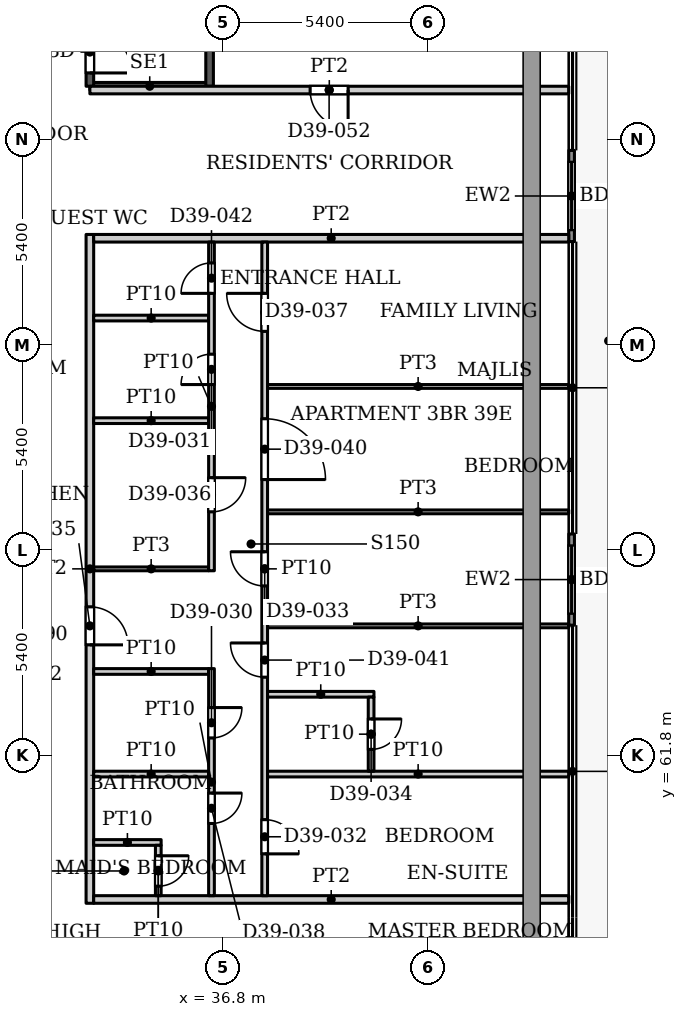
"""IFC4 building model, lengths in metres.
Left out: names, types, materials, properties, quantities, classifications, styles, units other than length and angle.
Written with IfcOpenShell. Run it as: python <this file> out.ifc"""

import sys

from ifc_helpers import new_model, si_unit, direction, frame, frame_2d, origin, place, context, subcontext, project, spatial, rectangle, extrude, source, transform, mapped, element, fill, save


model = new_model("IFC4")
c1 = context("Model", 3, precision=1e-05, world=origin(), true_north=direction((0.0, 1.0)))
c2 = subcontext(c1, "Body", "Model", "MODEL_VIEW")
j1 = project(units=[si_unit("LENGTHUNIT", "METRE"), si_unit("PLANEANGLEUNIT", "RADIAN")], contexts=[c1])
p1 = place(None, origin())
s1 = spatial("IfcSite", under=j1, at=p1, CompositionType="ELEMENT")
p2 = place(p1, origin())
s2 = spatial("IfcBuilding", under=s1, at=p2, CompositionType="ELEMENT")
p3 = place(p2, frame((0.0, 0.0, 168.2)))
s3 = spatial("IfcBuildingStorey", under=s2, at=p3, CompositionType="ELEMENT", Elevation=168.2)
p4 = place(p3, frame((45.975, 77.712, 0.0), z_axis=(0.0, 0.0, 1.0), x_axis=(0.0, -1.0, 0.0)))
e1 = element("IfcWall", 1, at=p4, inside=s3, PredefinedType="SOLIDWALL", context=c2, shape_type="SweptSolid", body=[
    extrude(rectangle(XDim=2.4, YDim=0.15, at=frame_2d((1.2, 0.0))), origin(), (0.0, 0.0, 1.0), 3.75),
])
p5 = place(p4, frame((0.3, 0.0, 0.0)))
e2 = element("IfcOpeningElement", 2, at=p5, cuts=e1, PredefinedType="OPENING", context=c2, shape_type="SweptSolid", body=[
    extrude(rectangle(XDim=1.8, YDim=2.4, at=frame_2d((0.9, 1.2))), frame((0.0, 0.085, 0.0), z_axis=(0.0, -1.0, 0.0), x_axis=(1.0, 0.0, 0.0)), (0.0, 0.0, 1.0), 0.17),
])
p6 = place(p3, frame((45.975, 67.618, 0.0), z_axis=(0.0, 0.0, 1.0), x_axis=(0.0, -1.0, 0.0)))
e3 = element("IfcWall", 3, at=p6, inside=s3, PredefinedType="SOLIDWALL", context=c2, shape_type="SweptSolid", body=[
    extrude(rectangle(XDim=2.4, YDim=0.15, at=frame_2d((1.2, 0.0))), origin(), (0.0, 0.0, 1.0), 3.75),
])
p7 = place(p6, frame((0.3, 0.0, 0.0)))
e4 = element("IfcOpeningElement", 4, at=p7, cuts=e3, PredefinedType="OPENING", context=c2, shape_type="SweptSolid", body=[
    extrude(rectangle(XDim=1.8, YDim=2.4, at=frame_2d((0.9, 1.2))), frame((0.0, 0.085, 0.0), z_axis=(0.0, -1.0, 0.0), x_axis=(1.0, 0.0, 0.0)), (0.0, 0.0, 1.0), 0.17),
])
p8 = place(p3, frame((33.3, 79.4, 0.0), z_axis=(0.0, 0.0, 1.0), x_axis=(1.0, 0.0, 0.0)))
e5 = element("IfcWall", 5, at=p8, inside=s3, PredefinedType="SHEAR", context=c2, shape_type="SweptSolid", body=[
    extrude(rectangle(XDim=3.15, YDim=0.2, at=frame_2d((1.575, 0.0))), origin(), (0.0, 0.0, 1.0), 3.9),
])
p9 = place(p3, frame((33.3, 79.4, 0.0), z_axis=(0.0, 0.0, 1.0), x_axis=(0.0, 1.0, 0.0)))
e6 = element("IfcWall", 6, at=p9, inside=s3, PredefinedType="SHEAR", context=c2, shape_type="SweptSolid", body=[
    extrude(rectangle(XDim=9.16, YDim=0.2, at=frame_2d((4.58, 0.0))), origin(), (0.0, 0.0, 1.0), 3.9),
])
p10 = place(p9, frame((0.35, 0.0, 0.0)))
e7 = element("IfcOpeningElement", 7, at=p10, cuts=e6, PredefinedType="OPENING", context=c2, shape_type="SweptSolid", body=[
    extrude(rectangle(XDim=1.1, YDim=2.2, at=frame_2d((0.55, 1.1))), frame((0.0, 0.11, 0.0), z_axis=(0.0, -1.0, 0.0), x_axis=(1.0, 0.0, 0.0)), (0.0, 0.0, 1.0), 0.22),
])
p11 = place(p3, frame((36.45, 79.4, 0.0), z_axis=(0.0, 0.0, 1.0), x_axis=(0.0, 1.0, 0.0)))
e8 = element("IfcWall", 8, at=p11, inside=s3, PredefinedType="SHEAR", context=c2, shape_type="SweptSolid", body=[
    extrude(rectangle(XDim=9.16, YDim=0.2, at=frame_2d((4.58, 0.0))), origin(), (0.0, 0.0, 1.0), 3.9),
])
p12 = place(p3, frame((33.3, 57.9, 0.0), z_axis=(0.0, 0.0, 1.0), x_axis=(0.0, 1.0, 0.0)))
e9 = element("IfcWall", 9, at=p12, inside=s3, PredefinedType="PARTITIONING", context=c2, shape_type="SweptSolid", body=[
    extrude(rectangle(XDim=17.6, YDim=0.2, at=frame_2d((8.8, 0.0))), origin(), (0.0, 0.0, 1.0), 3.6),
])
p13 = place(p12, frame((6.8, 0.0, 0.0)))
e10 = element("IfcOpeningElement", 10, at=p13, cuts=e9, PredefinedType="OPENING", context=c2, shape_type="SweptSolid", body=[
    extrude(rectangle(XDim=1.0, YDim=2.1, at=frame_2d((0.5, 1.05))), frame((0.0, 0.11, 0.0), z_axis=(0.0, -1.0, 0.0), x_axis=(1.0, 0.0, 0.0)), (0.0, 0.0, 1.0), 0.22),
])
p14 = place(p3, frame((33.3, 79.3, 0.0), z_axis=(0.0, 0.0, 1.0), x_axis=(1.0, 0.0, 0.0)))
e11 = element("IfcWall", 11, at=p14, inside=s3, PredefinedType="PARTITIONING", context=c2, shape_type="SweptSolid", body=[
    extrude(rectangle(XDim=12.6, YDim=0.2, at=frame_2d((6.3, 0.0))), origin(), (0.0, 0.0, 1.0), 3.6),
])
p15 = place(p14, frame((5.795, 0.0, 0.0)))
e12 = element("IfcOpeningElement", 12, at=p15, cuts=e11, PredefinedType="OPENING", context=c2, shape_type="SweptSolid", body=[
    extrude(rectangle(XDim=1.0, YDim=2.1, at=frame_2d((0.5, 1.05))), frame((0.0, 0.11, 0.0), z_axis=(0.0, -1.0, 0.0), x_axis=(1.0, 0.0, 0.0)), (0.0, 0.0, 1.0), 0.22),
])
p16 = place(p3, frame((33.4, 58.0, 0.0), z_axis=(0.0, 0.0, 1.0), x_axis=(1.0, 0.0, 0.0)))
e13 = element("IfcWall", 13, at=p16, inside=s3, PredefinedType="PARTITIONING", context=c2, shape_type="SweptSolid", body=[
    extrude(rectangle(XDim=12.5, YDim=0.2, at=frame_2d((6.25, 0.0))), origin(), (0.0, 0.0, 1.0), 3.6),
])
p17 = place(p3, frame((33.4, 59.5, 0.0), z_axis=(0.0, 0.0, 1.0), x_axis=(1.0, 0.0, 0.0)))
e14 = element("IfcWall", 14, at=p17, inside=s3, PredefinedType="PARTITIONING", context=c2, shape_type="SweptSolid", body=[
    extrude(rectangle(XDim=1.775, YDim=0.15, at=frame_2d((0.888, 0.0))), origin(), (0.0, 0.0, 1.0), 3.6),
])
for number, where, z_axis, x_axis in (
    (15, (33.4, 61.3, 0.0), (0.0, 0.0, 1.0), (1.0, 0.0, 0.0)),
    (16, (33.4, 64.0, 0.0), (0.0, 0.0, 1.0), (1.0, 0.0, 0.0)),
):
    element("IfcWall", number, at=place(p3, frame(where, z_axis=z_axis, x_axis=x_axis)), inside=s3, PredefinedType="PARTITIONING", context=c2, shape_type="SweptSolid", body=[
        extrude(rectangle(XDim=3.025, YDim=0.15, at=frame_2d((1.513, 0.0))), origin(), (0.0, 0.0, 1.0), 3.6),
    ])
p18 = place(p3, frame((33.4, 66.7, 0.0), z_axis=(0.0, 0.0, 1.0), x_axis=(1.0, 0.0, 0.0)))
e17 = element("IfcWall", 17, at=p18, inside=s3, PredefinedType="PARTITIONING", context=c2, shape_type="SweptSolid", body=[
    extrude(rectangle(XDim=3.025, YDim=0.1, at=frame_2d((1.513, 0.0))), origin(), (0.0, 0.0, 1.0), 3.6),
])
for number, where, z_axis, x_axis in (
    (18, (33.4, 70.6, 0.0), (0.0, 0.0, 1.0), (1.0, 0.0, 0.0)),
    (19, (33.4, 73.3, 0.0), (0.0, 0.0, 1.0), (1.0, 0.0, 0.0)),
):
    element("IfcWall", number, at=place(p3, frame(where, z_axis=z_axis, x_axis=x_axis)), inside=s3, PredefinedType="PARTITIONING", context=c2, shape_type="SweptSolid", body=[
        extrude(rectangle(XDim=3.025, YDim=0.15, at=frame_2d((1.513, 0.0))), origin(), (0.0, 0.0, 1.0), 3.6),
    ])
p19 = place(p3, frame((33.4, 75.4, 0.0), z_axis=(0.0, 0.0, 1.0), x_axis=(1.0, 0.0, 0.0)))
e20 = element("IfcWall", 20, at=p19, inside=s3, PredefinedType="PARTITIONING", context=c2, shape_type="SweptSolid", body=[
    extrude(rectangle(XDim=12.5, YDim=0.2, at=frame_2d((6.25, 0.0))), origin(), (0.0, 0.0, 1.0), 3.6),
])
p20 = place(p3, frame((35.1, 58.1, 0.0), z_axis=(0.0, 0.0, 1.0), x_axis=(0.0, 1.0, 0.0)))
e21 = element("IfcWall", 21, at=p20, inside=s3, PredefinedType="PARTITIONING", context=c2, shape_type="SweptSolid", body=[
    extrude(rectangle(XDim=1.325, YDim=0.15, at=frame_2d((0.663, 0.0))), origin(), (0.0, 0.0, 1.0), 3.6),
])
p21 = place(p20, frame((0.25, 0.0, 0.0)))
e22 = element("IfcOpeningElement", 22, at=p21, cuts=e21, PredefinedType="OPENING", context=c2, shape_type="SweptSolid", body=[
    extrude(rectangle(XDim=0.8, YDim=2.1, at=frame_2d((0.4, 1.05))), frame((0.0, 0.085, 0.0), z_axis=(0.0, -1.0, 0.0), x_axis=(1.0, 0.0, 0.0)), (0.0, 0.0, 1.0), 0.17),
])
p22 = place(p3, frame((36.5, 58.1, 0.0), z_axis=(0.0, 0.0, 1.0), x_axis=(0.0, 1.0, 0.0)))
e23 = element("IfcWall", 23, at=p22, inside=s3, PredefinedType="PARTITIONING", context=c2, shape_type="SweptSolid", body=[
    extrude(rectangle(XDim=5.975, YDim=0.15, at=frame_2d((2.987, 0.0))), origin(), (0.0, 0.0, 1.0), 3.6),
])
p23 = place(p22, frame((4.15, 0.0, 0.0)))
e24 = element("IfcOpeningElement", 24, at=p23, cuts=e23, PredefinedType="OPENING", context=c2, shape_type="SweptSolid", body=[
    extrude(rectangle(XDim=0.8, YDim=2.1, at=frame_2d((0.4, 1.05))), frame((0.0, 0.085, 0.0), z_axis=(0.0, -1.0, 0.0), x_axis=(1.0, 0.0, 0.0)), (0.0, 0.0, 1.0), 0.17),
])
p24 = place(p22, frame((1.9, 0.0, 0.0)))
e25 = element("IfcOpeningElement", 25, at=p24, cuts=e23, PredefinedType="OPENING", context=c2, shape_type="SweptSolid", body=[
    extrude(rectangle(XDim=0.8, YDim=2.1, at=frame_2d((0.4, 1.05))), frame((0.0, 0.085, 0.0), z_axis=(0.0, -1.0, 0.0), x_axis=(1.0, 0.0, 0.0)), (0.0, 0.0, 1.0), 0.17),
])
p25 = place(p3, frame((36.5, 66.65, 0.0), z_axis=(0.0, 0.0, 1.0), x_axis=(0.0, 1.0, 0.0)))
e26 = element("IfcWall", 26, at=p25, inside=s3, PredefinedType="PARTITIONING", context=c2, shape_type="SweptSolid", body=[
    extrude(rectangle(XDim=8.65, YDim=0.15, at=frame_2d((4.325, 0.0))), origin(), (0.0, 0.0, 1.0), 3.6),
])
p26 = place(p25, frame((4.9, 0.0, 0.0)))
e27 = element("IfcOpeningElement", 27, at=p26, cuts=e26, PredefinedType="OPENING", context=c2, shape_type="SweptSolid", body=[
    extrude(rectangle(XDim=0.8, YDim=2.1, at=frame_2d((0.4, 1.05))), frame((0.0, 0.085, 0.0), z_axis=(0.0, -1.0, 0.0), x_axis=(1.0, 0.0, 0.0)), (0.0, 0.0, 1.0), 0.17),
])
p27 = place(p25, frame((1.55, 0.0, 0.0)))
e28 = element("IfcOpeningElement", 28, at=p27, cuts=e26, PredefinedType="OPENING", context=c2, shape_type="SweptSolid", body=[
    extrude(rectangle(XDim=0.9, YDim=2.1, at=frame_2d((0.45, 1.05))), frame((0.0, 0.085, 0.0), z_axis=(0.0, -1.0, 0.0), x_axis=(1.0, 0.0, 0.0)), (0.0, 0.0, 1.0), 0.17),
])
p28 = place(p25, frame((7.3, 0.0, 0.0)))
e29 = element("IfcOpeningElement", 29, at=p28, cuts=e26, PredefinedType="OPENING", context=c2, shape_type="SweptSolid", body=[
    extrude(rectangle(XDim=0.8, YDim=2.1, at=frame_2d((0.4, 1.05))), frame((0.0, 0.085, 0.0), z_axis=(0.0, -1.0, 0.0), x_axis=(1.0, 0.0, 0.0)), (0.0, 0.0, 1.0), 0.17),
])
p29 = place(p3, frame((37.9, 58.1, 0.0), z_axis=(0.0, 0.0, 1.0), x_axis=(0.0, 1.0, 0.0)))
e30 = element("IfcWall", 30, at=p29, inside=s3, PredefinedType="PARTITIONING", context=c2, shape_type="SweptSolid", body=[
    extrude(rectangle(XDim=17.2, YDim=0.15, at=frame_2d((8.6, 0.0))), origin(), (0.0, 0.0, 1.0), 3.6),
])
p30 = place(p29, frame((1.1, 0.0, 0.0)))
e31 = element("IfcOpeningElement", 31, at=p30, cuts=e30, PredefinedType="OPENING", context=c2, shape_type="SweptSolid", body=[
    extrude(rectangle(XDim=0.9, YDim=2.1, at=frame_2d((0.45, 1.05))), frame((0.0, 0.085, 0.0), z_axis=(0.0, -1.0, 0.0), x_axis=(1.0, 0.0, 0.0)), (0.0, 0.0, 1.0), 0.17),
])
p31 = place(p29, frame((8.15, 0.0, 0.0)))
e32 = element("IfcOpeningElement", 32, at=p31, cuts=e30, PredefinedType="OPENING", context=c2, shape_type="SweptSolid", body=[
    extrude(rectangle(XDim=0.9, YDim=2.1, at=frame_2d((0.45, 1.05))), frame((0.0, 0.085, 0.0), z_axis=(0.0, -1.0, 0.0), x_axis=(1.0, 0.0, 0.0)), (0.0, 0.0, 1.0), 0.17),
])
p32 = place(p29, frame((14.85, 0.0, 0.0)))
e33 = element("IfcOpeningElement", 33, at=p32, cuts=e30, PredefinedType="OPENING", context=c2, shape_type="SweptSolid", body=[
    extrude(rectangle(XDim=1.0, YDim=2.1, at=frame_2d((0.5, 1.05))), frame((0.0, 0.085, 0.0), z_axis=(0.0, -1.0, 0.0), x_axis=(1.0, 0.0, 0.0)), (0.0, 0.0, 1.0), 0.17),
])
p33 = place(p29, frame((10.95, 0.0, 0.0)))
e34 = element("IfcOpeningElement", 34, at=p33, cuts=e30, PredefinedType="OPENING", context=c2, shape_type="SweptSolid", body=[
    extrude(rectangle(XDim=1.6, YDim=2.1, at=frame_2d((0.8, 1.05))), frame((0.0, 0.085, 0.0), z_axis=(0.0, -1.0, 0.0), x_axis=(1.0, 0.0, 0.0)), (0.0, 0.0, 1.0), 0.17),
])
p34 = place(p29, frame((5.75, 0.0, 0.0)))
e35 = element("IfcOpeningElement", 35, at=p34, cuts=e30, PredefinedType="OPENING", context=c2, shape_type="SweptSolid", body=[
    extrude(rectangle(XDim=0.9, YDim=2.1, at=frame_2d((0.45, 1.05))), frame((0.0, 0.085, 0.0), z_axis=(0.0, -1.0, 0.0), x_axis=(1.0, 0.0, 0.0)), (0.0, 0.0, 1.0), 0.17),
])
p35 = place(p3, frame((37.975, 61.3, 0.0), z_axis=(0.0, 0.0, 1.0), x_axis=(1.0, 0.0, 0.0)))
e36 = element("IfcWall", 36, at=p35, inside=s3, PredefinedType="PARTITIONING", context=c2, shape_type="SweptSolid", body=[
    extrude(rectangle(XDim=7.925, YDim=0.15, at=frame_2d((3.962, 0.0))), origin(), (0.0, 0.0, 1.0), 3.6),
])
p36 = place(p3, frame((37.975, 63.4, 0.0), z_axis=(0.0, 0.0, 1.0), x_axis=(1.0, 0.0, 0.0)))
e37 = element("IfcWall", 37, at=p36, inside=s3, PredefinedType="PARTITIONING", context=c2, shape_type="SweptSolid", body=[
    extrude(rectangle(XDim=2.8, YDim=0.15, at=frame_2d((1.4, 0.0))), origin(), (0.0, 0.0, 1.0), 3.6),
])
for number, where, z_axis, x_axis in (
    (38, (37.975, 65.2, 0.0), (0.0, 0.0, 1.0), (1.0, 0.0, 0.0)),
    (39, (37.975, 68.2, 0.0), (0.0, 0.0, 1.0), (1.0, 0.0, 0.0)),
    (40, (37.975, 71.5, 0.0), (0.0, 0.0, 1.0), (1.0, 0.0, 0.0)),
):
    element("IfcWall", number, at=place(p3, frame(where, z_axis=z_axis, x_axis=x_axis)), inside=s3, PredefinedType="PARTITIONING", context=c2, shape_type="SweptSolid", body=[
        extrude(rectangle(XDim=7.925, YDim=0.1, at=frame_2d((3.962, 0.0))), origin(), (0.0, 0.0, 1.0), 3.6),
    ])
p37 = place(p3, frame((40.7, 61.375, 0.0), z_axis=(0.0, 0.0, 1.0), x_axis=(0.0, 1.0, 0.0)))
e41 = element("IfcWall", 41, at=p37, inside=s3, PredefinedType="PARTITIONING", context=c2, shape_type="SweptSolid", body=[
    extrude(rectangle(XDim=1.95, YDim=0.15, at=frame_2d((0.975, 0.0))), origin(), (0.0, 0.0, 1.0), 3.6),
])
p38 = place(p37, frame((0.575, 0.0, 0.0)))
e42 = element("IfcOpeningElement", 42, at=p38, cuts=e41, PredefinedType="OPENING", context=c2, shape_type="SweptSolid", body=[
    extrude(rectangle(XDim=0.8, YDim=2.1, at=frame_2d((0.4, 1.05))), frame((0.0, 0.085, 0.0), z_axis=(0.0, -1.0, 0.0), x_axis=(1.0, 0.0, 0.0)), (0.0, 0.0, 1.0), 0.17),
])
m1 = source(origin(), c2, "Body", "SweptSolid", [
    extrude(rectangle(XDim=1.8, YDim=2.4, at=frame_2d((0.9, 1.2))), frame((0.0, 0.025, 0.0), z_axis=(0.0, -1.0, 0.0), x_axis=(1.0, 0.0, 0.0)), (0.0, 0.0, 1.0), 0.05),
])
p39 = place(p5, origin())
e43 = element("IfcDoor", 43, at=p39, inside=s3, OperationType="SLIDING_TO_LEFT", PredefinedType="DOOR", context=c2, shape_type="MappedRepresentation", body=[
    mapped(m1, transform((0.0, 0.0, 0.0), x_axis=(1.0, 0.0, 0.0), y_axis=(0.0, 1.0, 0.0), z_axis=(0.0, 0.0, 1.0), scale=1.0)),
])
fill(e2, e43)
p40 = place(p7, origin())
e44 = element("IfcDoor", 44, at=p40, inside=s3, OperationType="SLIDING_TO_LEFT", PredefinedType="DOOR", context=c2, shape_type="MappedRepresentation", body=[
    mapped(m1, transform((0.0, 0.0, 0.0), x_axis=(1.0, 0.0, 0.0), y_axis=(0.0, 1.0, 0.0), z_axis=(0.0, 0.0, 1.0), scale=1.0)),
])
fill(e4, e44)
m2 = source(origin(), c2, "Body", "SweptSolid", [
    extrude(rectangle(XDim=1.1, YDim=2.2, at=frame_2d((0.55, 1.1))), frame((0.0, 0.025, 0.0), z_axis=(0.0, -1.0, 0.0), x_axis=(1.0, 0.0, 0.0)), (0.0, 0.0, 1.0), 0.05),
])
p41 = place(p10, origin())
e45 = element("IfcDoor", 45, at=p41, inside=s3, OperationType="SINGLE_SWING_RIGHT", PredefinedType="DOOR", context=c2, shape_type="MappedRepresentation", body=[
    mapped(m2, transform((0.0, 0.0, 0.0), x_axis=(1.0, 0.0, 0.0), y_axis=(0.0, 1.0, 0.0), z_axis=(0.0, 0.0, 1.0), scale=1.0)),
])
fill(e7, e45)
m3 = source(origin(), c2, "Body", "SweptSolid", [
    extrude(rectangle(XDim=0.8, YDim=2.1, at=frame_2d((0.4, 1.05))), frame((0.0, 0.025, 0.0), z_axis=(0.0, -1.0, 0.0), x_axis=(1.0, 0.0, 0.0)), (0.0, 0.0, 1.0), 0.05),
])
p42 = place(p23, origin())
e46 = element("IfcDoor", 46, at=p42, inside=s3, OperationType="SINGLE_SWING_RIGHT", PredefinedType="DOOR", context=c2, shape_type="MappedRepresentation", body=[
    mapped(m3, transform((0.0, 0.0, 0.0), x_axis=(1.0, 0.0, 0.0), y_axis=(0.0, 1.0, 0.0), z_axis=(0.0, 0.0, 1.0), scale=1.0)),
])
fill(e24, e46)
p43 = place(p26, origin())
e47 = element("IfcDoor", 47, at=p43, inside=s3, OperationType="SINGLE_SWING_LEFT", PredefinedType="DOOR", context=c2, shape_type="MappedRepresentation", body=[
    mapped(m3, transform((0.0, 0.0, 0.0), x_axis=(1.0, 0.0, 0.0), y_axis=(0.0, 1.0, 0.0), z_axis=(0.0, 0.0, 1.0), scale=1.0)),
])
fill(e27, e47)
m4 = source(origin(), c2, "Body", "SweptSolid", [
    extrude(rectangle(XDim=0.9, YDim=2.1, at=frame_2d((0.45, 1.05))), frame((0.0, 0.025, 0.0), z_axis=(0.0, -1.0, 0.0), x_axis=(1.0, 0.0, 0.0)), (0.0, 0.0, 1.0), 0.05),
])
p44 = place(p30, origin())
e48 = element("IfcDoor", 48, at=p44, inside=s3, OperationType="SINGLE_SWING_RIGHT", PredefinedType="DOOR", context=c2, shape_type="MappedRepresentation", body=[
    mapped(m4, transform((0.0, 0.0, 0.0), x_axis=(1.0, 0.0, 0.0), y_axis=(0.0, 1.0, 0.0), z_axis=(0.0, 0.0, 1.0), scale=1.0)),
])
fill(e31, e48)
p45 = place(p31, origin())
e49 = element("IfcDoor", 49, at=p45, inside=s3, OperationType="SINGLE_SWING_LEFT", PredefinedType="DOOR", context=c2, shape_type="MappedRepresentation", body=[
    mapped(m4, transform((0.0, 0.0, 0.0), x_axis=(1.0, 0.0, 0.0), y_axis=(0.0, 1.0, 0.0), z_axis=(0.0, 0.0, 1.0), scale=1.0)),
])
fill(e32, e49)
p46 = place(p38, origin())
e50 = element("IfcDoor", 50, at=p46, inside=s3, OperationType="SINGLE_SWING_RIGHT", PredefinedType="DOOR", context=c2, shape_type="MappedRepresentation", body=[
    mapped(m3, transform((0.0, 0.0, 0.0), x_axis=(1.0, 0.0, 0.0), y_axis=(0.0, 1.0, 0.0), z_axis=(0.0, 0.0, 1.0), scale=1.0)),
])
fill(e42, e50)
m5 = source(origin(), c2, "Body", "SweptSolid", [
    extrude(rectangle(XDim=1.0, YDim=2.1, at=frame_2d((0.5, 1.05))), frame((0.0, 0.025, 0.0), z_axis=(0.0, -1.0, 0.0), x_axis=(1.0, 0.0, 0.0)), (0.0, 0.0, 1.0), 0.05),
])
p47 = place(p13, origin())
e51 = element("IfcDoor", 51, at=p47, inside=s3, OperationType="SINGLE_SWING_RIGHT", PredefinedType="DOOR", context=c2, shape_type="MappedRepresentation", body=[
    mapped(m5, transform((0.0, 0.0, 0.0), x_axis=(1.0, 0.0, 0.0), y_axis=(0.0, 1.0, 0.0), z_axis=(0.0, 0.0, 1.0), scale=1.0)),
])
fill(e10, e51)
p48 = place(p27, origin())
e52 = element("IfcDoor", 52, at=p48, inside=s3, OperationType="SINGLE_SWING_RIGHT", PredefinedType="DOOR", context=c2, shape_type="MappedRepresentation", body=[
    mapped(m4, transform((0.0, 0.0, 0.0), x_axis=(1.0, 0.0, 0.0), y_axis=(0.0, 1.0, 0.0), z_axis=(0.0, 0.0, 1.0), scale=1.0)),
])
fill(e28, e52)
m6 = source(origin(), c2, "Body", "SweptSolid", [
    extrude(rectangle(XDim=1.0, YDim=2.1, at=frame_2d((0.5, 1.05))), frame((0.0, 0.025, 0.0), z_axis=(0.0, -1.0, 0.0), x_axis=(1.0, 0.0, 0.0)), (0.0, 0.0, 1.0), 0.05),
])
p49 = place(p32, origin())
e53 = element("IfcDoor", 53, at=p49, inside=s3, OperationType="SINGLE_SWING_LEFT", PredefinedType="DOOR", context=c2, shape_type="MappedRepresentation", body=[
    mapped(m6, transform((0.0, 0.0, 0.0), x_axis=(1.0, 0.0, 0.0), y_axis=(0.0, 1.0, 0.0), z_axis=(0.0, 0.0, 1.0), scale=1.0)),
])
fill(e33, e53)
p50 = place(p24, origin())
e54 = element("IfcDoor", 54, at=p50, inside=s3, OperationType="SINGLE_SWING_RIGHT", PredefinedType="DOOR", context=c2, shape_type="MappedRepresentation", body=[
    mapped(m3, transform((0.0, 0.0, 0.0), x_axis=(1.0, 0.0, 0.0), y_axis=(0.0, 1.0, 0.0), z_axis=(0.0, 0.0, 1.0), scale=1.0)),
])
fill(e25, e54)
p51 = place(p21, origin())
e55 = element("IfcDoor", 55, at=p51, inside=s3, OperationType="SINGLE_SWING_RIGHT", PredefinedType="DOOR", context=c2, shape_type="MappedRepresentation", body=[
    mapped(m3, transform((0.0, 0.0, 0.0), x_axis=(1.0, 0.0, 0.0), y_axis=(0.0, 1.0, 0.0), z_axis=(0.0, 0.0, 1.0), scale=1.0)),
])
fill(e22, e55)
m7 = source(origin(), c2, "Body", "SweptSolid", [
    extrude(rectangle(XDim=1.6, YDim=2.1, at=frame_2d((0.8, 1.05))), frame((0.0, 0.025, 0.0), z_axis=(0.0, -1.0, 0.0), x_axis=(1.0, 0.0, 0.0)), (0.0, 0.0, 1.0), 0.05),
])
p52 = place(p33, origin())
e56 = element("IfcDoor", 56, at=p52, inside=s3, OperationType="DOUBLE_DOOR_SINGLE_SWING", PredefinedType="DOOR", context=c2, shape_type="MappedRepresentation", body=[
    mapped(m7, transform((0.0, 0.0, 0.0), x_axis=(1.0, 0.0, 0.0), y_axis=(0.0, 1.0, 0.0), z_axis=(0.0, 0.0, 1.0), scale=1.0)),
])
fill(e34, e56)
p53 = place(p34, origin())
e57 = element("IfcDoor", 57, at=p53, inside=s3, OperationType="SINGLE_SWING_LEFT", PredefinedType="DOOR", context=c2, shape_type="MappedRepresentation", body=[
    mapped(m4, transform((0.0, 0.0, 0.0), x_axis=(1.0, 0.0, 0.0), y_axis=(0.0, 1.0, 0.0), z_axis=(0.0, 0.0, 1.0), scale=1.0)),
])
fill(e35, e57)
p54 = place(p28, origin())
e58 = element("IfcDoor", 58, at=p54, inside=s3, OperationType="SINGLE_SWING_LEFT", PredefinedType="DOOR", context=c2, shape_type="MappedRepresentation", body=[
    mapped(m3, transform((0.0, 0.0, 0.0), x_axis=(1.0, 0.0, 0.0), y_axis=(0.0, 1.0, 0.0), z_axis=(0.0, 0.0, 1.0), scale=1.0)),
])
fill(e29, e58)
m8 = source(origin(), c2, "Body", "SweptSolid", [
    extrude(rectangle(XDim=1.0, YDim=2.1, at=frame_2d((0.5, 1.05))), frame((0.0, 0.025, 0.0), z_axis=(0.0, -1.0, 0.0), x_axis=(1.0, 0.0, 0.0)), (0.0, 0.0, 1.0), 0.05),
])
p55 = place(p15, origin())
e59 = element("IfcDoor", 59, at=p55, inside=s3, OperationType="SINGLE_SWING_RIGHT", PredefinedType="DOOR", context=c2, shape_type="MappedRepresentation", body=[
    mapped(m8, transform((0.0, 0.0, 0.0), x_axis=(1.0, 0.0, 0.0), y_axis=(0.0, 1.0, 0.0), z_axis=(0.0, 0.0, 1.0), scale=1.0)),
])
fill(e12, e59)
save(model, sys.argv[1])
